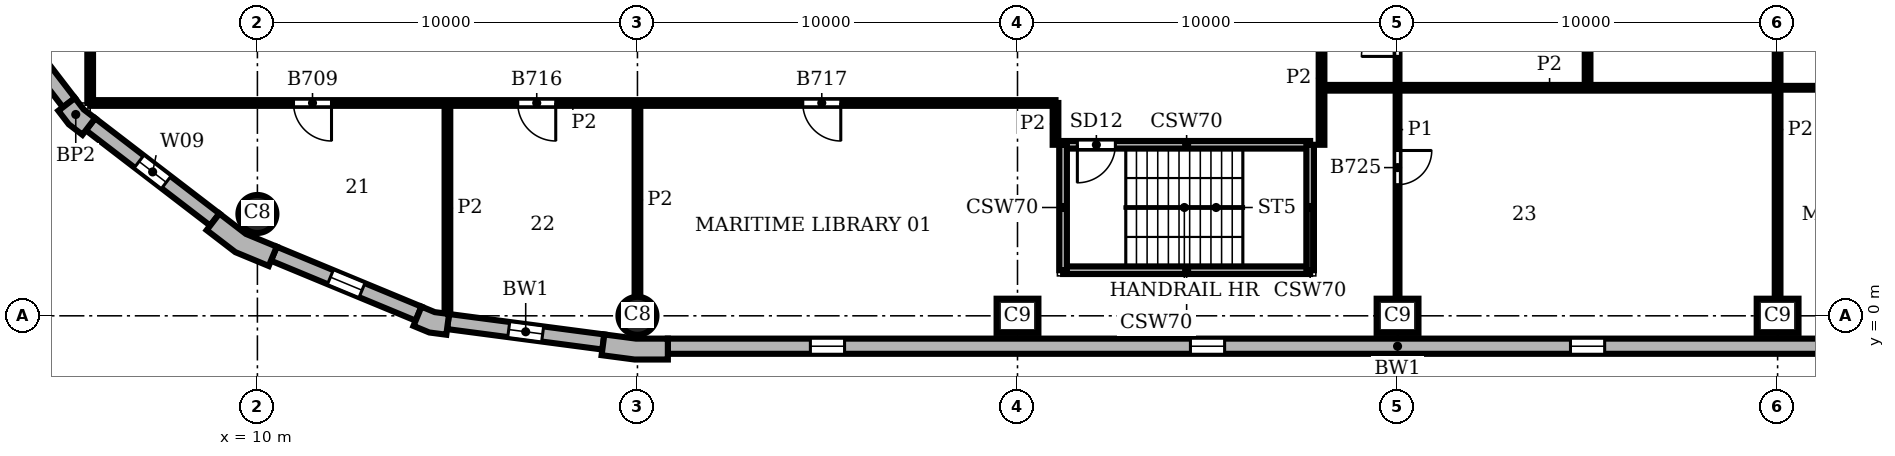
"""IFC4 building model, lengths in metres.
Left out: names, types, materials, properties, quantities, classifications, styles, units other than length and angle.
Written with IfcOpenShell. Run it as: python <this file> out.ifc"""

import sys

from ifc_helpers import new_model, si_unit, direction, frame, frame_2d, origin, origin_2d, place, context, subcontext, project, spatial, polyline, rectangle, circle, outline, extrude, element, fill, save


model = new_model("IFC4")
c1 = context("Model", 3, precision=1e-05, world=origin(), true_north=direction((0.0, 1.0)))
c2 = subcontext(c1, "Body", "Model", "MODEL_VIEW")
j1 = project(units=[si_unit("LENGTHUNIT", "METRE"), si_unit("PLANEANGLEUNIT", "RADIAN")], contexts=[c1])
p1 = place(None, origin())
s1 = spatial("IfcSite", under=j1, at=p1, CompositionType="ELEMENT")
p2 = place(p1, origin())
s2 = spatial("IfcBuilding", under=s1, at=p2, CompositionType="ELEMENT")
p3 = place(p2, frame((0.0, 0.0, 209.7)))
s3 = spatial("IfcBuildingStorey", under=s2, at=p3, CompositionType="ELEMENT", Elevation=209.7)
p4 = place(p3, frame((20.0, 0.0, 0.0), z_axis=(0.0, 0.0, 1.0), x_axis=(1.0, 0.0, 0.0)))
e1 = element("IfcColumn", 1, at=p4, inside=s3, PredefinedType="COLUMN", context=c2, shape_type="SweptSolid", body=[
    extrude(circle(Radius=0.5, at=origin_2d()), origin(), (0.0, 0.0, 1.0), 3.9),
])
for number, where, z_axis, x_axis in (
    (2, (30.0, 0.0, 0.0), (0.0, 0.0, 1.0), (1.0, 0.0, 0.0)),
    (3, (40.0, 0.0, 0.0), (0.0, 0.0, 1.0), (1.0, 0.0, 0.0)),
    (4, (50.0, 0.0, 0.0), (0.0, 0.0, 1.0), (1.0, 0.0, 0.0)),
):
    element("IfcColumn", number, at=place(p3, frame(where, z_axis=z_axis, x_axis=x_axis)), inside=s3, PredefinedType="COLUMN", context=c2, shape_type="SweptSolid", body=[
        extrude(rectangle(XDim=1.1, YDim=0.9, at=origin_2d()), origin(), (0.0, 0.0, 1.0), 3.9),
    ])
p5 = place(p3, frame((10.0, 2.679, 0.0), z_axis=(0.0, 0.0, 1.0), x_axis=(1.0, 0.0, 0.0)))
e5 = element("IfcColumn", 5, at=p5, inside=s3, PredefinedType="COLUMN", context=c2, shape_type="SweptSolid", body=[
    extrude(circle(Radius=0.5, at=origin_2d()), origin(), (0.0, 0.0, 1.0), 3.9),
])
p6 = place(p3, origin())
e6 = element("IfcWall", 6, at=p6, inside=s3, PredefinedType="SOLIDWALL", context=c2, shape_type="SweptSolid", body=[
    extrude(outline(polyline([(19.076, -0.887), (19.057, -1.036), (19.925, -1.15), (20.8, -1.15), (20.8, -1.0), (20.8, -0.6), (19.961, -0.6), (19.128, -0.49), (19.076, -0.887)])), origin(), (0.0, 0.0, 1.0), 3.9),
])
e7 = element("IfcWall", 7, at=p6, inside=s3, PredefinedType="SOLIDWALL", context=c2, shape_type="SweptSolid", body=[
    extrude(outline(polyline([(4.882, 5.487), (4.763, 5.396), (5.038, 5.038), (5.396, 4.763), (5.487, 4.882), (5.731, 5.199), (5.43, 5.43), (5.199, 5.731), (4.882, 5.487)])), origin(), (0.0, 0.0, 1.0), 3.9),
])
e8 = element("IfcWall", 8, at=p6, inside=s3, PredefinedType="SOLIDWALL", context=c2, shape_type="SweptSolid", body=[
    extrude(outline(polyline([(8.757, 2.373), (8.665, 2.254), (9.42, 1.675), (10.299, 1.311), (10.356, 1.449), (10.51, 1.819), (9.698, 2.155), (9.0, 2.69), (8.757, 2.373)])), origin(), (0.0, 0.0, 1.0), 3.9),
])
e9 = element("IfcWall", 9, at=p6, inside=s3, PredefinedType="SOLIDWALL", context=c2, shape_type="SweptSolid", body=[
    extrude(outline(polyline([(14.164, -0.128), (14.106, -0.266), (14.523, -0.439), (14.971, -0.498), (14.99, -0.349), (15.043, 0.047), (14.667, 0.097), (14.317, 0.242), (14.164, -0.128)])), origin(), (0.0, 0.0, 1.0), 3.9),
])
p7 = place(p3, frame((20.8, -0.8, 0.0), z_axis=(0.0, 0.0, 1.0), x_axis=(1.0, 0.0, 0.0)))
e10 = element("IfcWall", 10, at=p7, inside=s3, PredefinedType="SOLIDWALL", context=c2, shape_type="SweptSolid", body=[
    extrude(rectangle(XDim=38.4, YDim=0.4, at=frame_2d((19.2, 0.0))), origin(), (0.0, 0.0, 1.0), 3.9),
])
p8 = place(p7, frame((3.75, 0.0, 0.9)))
e11 = element("IfcOpeningElement", 11, at=p8, cuts=e10, PredefinedType="OPENING", context=c2, shape_type="SweptSolid", body=[
    extrude(rectangle(XDim=0.9, YDim=2.35, at=frame_2d((0.45, 1.175))), frame((0.0, 0.21, 0.0), z_axis=(0.0, -1.0, 0.0), x_axis=(1.0, 0.0, 0.0)), (0.0, 0.0, 1.0), 0.42),
])
p9 = place(p7, frame((13.75, 0.0, 0.9)))
e12 = element("IfcOpeningElement", 12, at=p9, cuts=e10, PredefinedType="OPENING", context=c2, shape_type="SweptSolid", body=[
    extrude(rectangle(XDim=0.9, YDim=2.35, at=frame_2d((0.45, 1.175))), frame((0.0, 0.21, 0.0), z_axis=(0.0, -1.0, 0.0), x_axis=(1.0, 0.0, 0.0)), (0.0, 0.0, 1.0), 0.42),
])
p10 = place(p7, frame((23.75, 0.0, 0.9)))
e13 = element("IfcOpeningElement", 13, at=p10, cuts=e10, PredefinedType="OPENING", context=c2, shape_type="SweptSolid", body=[
    extrude(rectangle(XDim=0.9, YDim=2.35, at=frame_2d((0.45, 1.175))), frame((0.0, 0.21, 0.0), z_axis=(0.0, -1.0, 0.0), x_axis=(1.0, 0.0, 0.0)), (0.0, 0.0, 1.0), 0.42),
])
p11 = place(p7, frame((33.75, 0.0, 0.9)))
e14 = element("IfcOpeningElement", 14, at=p11, cuts=e10, PredefinedType="OPENING", context=c2, shape_type="SweptSolid", body=[
    extrude(rectangle(XDim=0.9, YDim=2.35, at=frame_2d((0.45, 1.175))), frame((0.0, 0.21, 0.0), z_axis=(0.0, -1.0, 0.0), x_axis=(1.0, 0.0, 0.0)), (0.0, 0.0, 1.0), 0.42),
])
p12 = place(p3, frame((2.532, 8.878, 0.0), z_axis=(0.0, 0.0, 1.0), x_axis=(0.608759824817, -0.793354571229, 0.0)))
e15 = element("IfcWall", 15, at=p12, inside=s3, PredefinedType="SOLIDWALL", context=c2, shape_type="SweptSolid", body=[
    extrude(rectangle(XDim=4.121, YDim=0.4, at=frame_2d((2.061, 0.0))), origin(), (0.0, 0.0, 1.0), 3.9),
])
p13 = place(p12, frame((1.611, 0.0, 0.9)))
e16 = element("IfcOpeningElement", 16, at=p13, cuts=e15, PredefinedType="OPENING", context=c2, shape_type="SweptSolid", body=[
    extrude(rectangle(XDim=0.9, YDim=2.35, at=frame_2d((0.45, 1.175))), frame((0.0, 0.21, 0.0), z_axis=(0.0, -1.0, 0.0), x_axis=(1.0, 0.0, 0.0)), (0.0, 0.0, 1.0), 0.42),
])
p14 = place(p3, frame((5.609, 5.041, 0.0), z_axis=(0.0, 0.0, 1.0), x_axis=(0.793354571229, -0.608759824817, 0.0)))
e17 = element("IfcWall", 17, at=p14, inside=s3, PredefinedType="SOLIDWALL", context=c2, shape_type="SweptSolid", body=[
    extrude(rectangle(XDim=4.121, YDim=0.4, at=frame_2d((2.061, 0.0))), origin(), (0.0, 0.0, 1.0), 3.9),
])
p15 = place(p14, frame((1.611, 0.0, 0.9)))
e18 = element("IfcOpeningElement", 18, at=p15, cuts=e17, PredefinedType="OPENING", context=c2, shape_type="SweptSolid", body=[
    extrude(rectangle(XDim=0.9, YDim=2.35, at=frame_2d((0.45, 1.175))), frame((0.0, 0.21, 0.0), z_axis=(0.0, -1.0, 0.0), x_axis=(1.0, 0.0, 0.0)), (0.0, 0.0, 1.0), 0.42),
])
p16 = place(p3, frame((10.433, 1.634, 0.0), z_axis=(0.0, 0.0, 1.0), x_axis=(0.923863744394, -0.382721546029, 0.0)))
e19 = element("IfcWall", 19, at=p16, inside=s3, PredefinedType="SOLIDWALL", context=c2, shape_type="SweptSolid", body=[
    extrude(rectangle(XDim=4.121, YDim=0.4, at=frame_2d((2.061, 0.0))), origin(), (0.0, 0.0, 1.0), 3.9),
])
p17 = place(p16, frame((1.611, 0.0, 0.9)))
e20 = element("IfcOpeningElement", 20, at=p17, cuts=e19, PredefinedType="OPENING", context=c2, shape_type="SweptSolid", body=[
    extrude(rectangle(XDim=0.9, YDim=2.35, at=frame_2d((0.45, 1.175))), frame((0.0, 0.21, 0.0), z_axis=(0.0, -1.0, 0.0), x_axis=(1.0, 0.0, 0.0)), (0.0, 0.0, 1.0), 0.42),
])
p18 = place(p3, frame((15.017, -0.151, 0.0), z_axis=(0.0, 0.0, 1.0), x_axis=(0.991446429508, -0.130514280502, 0.0)))
e21 = element("IfcWall", 21, at=p18, inside=s3, PredefinedType="SOLIDWALL", context=c2, shape_type="SweptSolid", body=[
    extrude(rectangle(XDim=4.121, YDim=0.4, at=frame_2d((2.061, 0.0))), origin(), (0.0, 0.0, 1.0), 3.9),
])
p19 = place(p18, frame((1.611, 0.0, 0.9)))
e22 = element("IfcOpeningElement", 22, at=p19, cuts=e21, PredefinedType="OPENING", context=c2, shape_type="SweptSolid", body=[
    extrude(rectangle(XDim=0.9, YDim=2.35, at=frame_2d((0.45, 1.175))), frame((0.0, 0.21, 0.0), z_axis=(0.0, -1.0, 0.0), x_axis=(1.0, 0.0, 0.0)), (0.0, 0.0, 1.0), 0.42),
])
p20 = place(p3, frame((31.2, 1.2, 0.0), z_axis=(0.0, 0.0, 1.0), x_axis=(1.0, 0.0, 0.0)))
e23 = element("IfcWall", 23, at=p20, inside=s3, PredefinedType="SHEAR", context=c2, shape_type="SweptSolid", body=[
    extrude(rectangle(XDim=6.5, YDim=0.2, at=frame_2d((3.25, 0.0))), origin(), (0.0, 0.0, 1.0), 3.58),
])
p21 = place(p3, frame((31.2, 4.5, 0.0), z_axis=(0.0, 0.0, 1.0), x_axis=(1.0, 0.0, 0.0)))
e24 = element("IfcWall", 24, at=p21, inside=s3, PredefinedType="SHEAR", context=c2, shape_type="SweptSolid", body=[
    extrude(rectangle(XDim=6.5, YDim=0.2, at=frame_2d((3.25, 0.0))), origin(), (0.0, 0.0, 1.0), 3.58),
])
p22 = place(p21, frame((0.375, 0.0, 0.0)))
e25 = element("IfcOpeningElement", 25, at=p22, cuts=e24, PredefinedType="OPENING", context=c2, shape_type="SweptSolid", body=[
    extrude(rectangle(XDim=1.0, YDim=2.1, at=frame_2d((0.5, 1.05))), frame((0.0, 0.11, 0.0), z_axis=(0.0, -1.0, 0.0), x_axis=(1.0, 0.0, 0.0)), (0.0, 0.0, 1.0), 0.22),
])
for number, where, z_axis, x_axis in (
    (26, (31.2, 1.2, 0.0), (0.0, 0.0, 1.0), (0.0, 1.0, 0.0)),
    (27, (37.7, 1.2, 0.0), (0.0, 0.0, 1.0), (0.0, 1.0, 0.0)),
):
    element("IfcWall", number, at=place(p3, frame(where, z_axis=z_axis, x_axis=x_axis)), inside=s3, PredefinedType="SHEAR", context=c2, shape_type="SweptSolid", body=[
        extrude(rectangle(XDim=3.3, YDim=0.2, at=frame_2d((1.65, 0.0))), origin(), (0.0, 0.0, 1.0), 3.58),
    ])
p23 = place(p3, frame((40.0, 0.45, 0.0), z_axis=(0.0, 0.0, 1.0), x_axis=(0.0, 1.0, 0.0)))
e28 = element("IfcWall", 28, at=p23, inside=s3, PredefinedType="PARTITIONING", context=c2, shape_type="SweptSolid", body=[
    extrude(rectangle(XDim=8.9, YDim=0.1, at=frame_2d((4.45, 0.0))), origin(), (0.0, 0.0, 1.0), 3.58),
])
p24 = place(p23, frame((6.375, 0.0, 0.0)))
e29 = element("IfcOpeningElement", 29, at=p24, cuts=e28, PredefinedType="OPENING", context=c2, shape_type="SweptSolid", body=[
    extrude(rectangle(XDim=0.95, YDim=2.1, at=frame_2d((0.475, 1.05))), frame((0.0, 0.06, 0.0), z_axis=(0.0, -1.0, 0.0), x_axis=(1.0, 0.0, 0.0)), (0.0, 0.0, 1.0), 0.12),
])
p25 = place(p23, frame((3.0, 0.0, 0.0)))
e30 = element("IfcOpeningElement", 30, at=p25, cuts=e28, PredefinedType="OPENING", context=c2, shape_type="SweptSolid", body=[
    extrude(rectangle(XDim=0.9, YDim=2.1, at=frame_2d((0.45, 1.05))), frame((0.0, 0.06, 0.0), z_axis=(0.0, -1.0, 0.0), x_axis=(1.0, 0.0, 0.0)), (0.0, 0.0, 1.0), 0.12),
])
p26 = place(p3, frame((50.0, 6.0, 0.0), z_axis=(0.0, 0.0, 1.0), x_axis=(1.0, 0.0, 0.0)))
e31 = element("IfcWall", 31, at=p26, inside=s3, PredefinedType="PARTITIONING", context=c2, shape_type="SweptSolid", body=[
    extrude(rectangle(XDim=5.0, YDim=0.1, at=frame_2d((2.5, 0.0))), origin(), (0.0, 0.0, 1.0), 3.58),
])
p27 = place(p3, frame((5.6, 5.6, 0.0), z_axis=(0.0, 0.0, 1.0), x_axis=(0.0, 1.0, 0.0)))
e32 = element("IfcWall", 32, at=p27, inside=s3, PredefinedType="PARTITIONING", context=c2, shape_type="SweptSolid", body=[
    extrude(rectangle(XDim=22.4, YDim=0.15, at=frame_2d((11.2, 0.0))), origin(), (0.0, 0.0, 1.0), 3.58),
])
p28 = place(p27, frame((5.35, 0.0, 0.0)))
e33 = element("IfcOpeningElement", 33, at=p28, cuts=e32, PredefinedType="OPENING", context=c2, shape_type="SweptSolid", body=[
    extrude(rectangle(XDim=1.0, YDim=2.1, at=frame_2d((0.5, 1.05))), frame((0.0, 0.085, 0.0), z_axis=(0.0, -1.0, 0.0), x_axis=(1.0, 0.0, 0.0)), (0.0, 0.0, 1.0), 0.17),
])
p29 = place(p27, frame((11.5, 0.0, 0.0)))
e34 = element("IfcOpeningElement", 34, at=p29, cuts=e32, PredefinedType="OPENING", context=c2, shape_type="SweptSolid", body=[
    extrude(rectangle(XDim=1.0, YDim=2.1, at=frame_2d((0.5, 1.05))), frame((0.0, 0.085, 0.0), z_axis=(0.0, -1.0, 0.0), x_axis=(1.0, 0.0, 0.0)), (0.0, 0.0, 1.0), 0.17),
])
p30 = place(p27, frame((18.25, 0.0, 0.0)))
e35 = element("IfcOpeningElement", 35, at=p30, cuts=e32, PredefinedType="OPENING", context=c2, shape_type="SweptSolid", body=[
    extrude(rectangle(XDim=1.8, YDim=2.1, at=frame_2d((0.9, 1.05))), frame((0.0, 0.085, 0.0), z_axis=(0.0, -1.0, 0.0), x_axis=(1.0, 0.0, 0.0)), (0.0, 0.0, 1.0), 0.17),
])
p31 = place(p3, frame((15.0, 0.063, 0.0), z_axis=(0.0, 0.0, 1.0), x_axis=(0.0, 1.0, 0.0)))
e36 = element("IfcWall", 36, at=p31, inside=s3, PredefinedType="PARTITIONING", context=c2, shape_type="SweptSolid", body=[
    extrude(rectangle(XDim=5.537, YDim=0.15, at=frame_2d((2.769, 0.0))), origin(), (0.0, 0.0, 1.0), 3.58),
])
p32 = place(p3, frame((20.0, 0.5, 0.0), z_axis=(0.0, 0.0, 1.0), x_axis=(0.0, 1.0, 0.0)))
e37 = element("IfcWall", 37, at=p32, inside=s3, PredefinedType="PARTITIONING", context=c2, shape_type="SweptSolid", body=[
    extrude(rectangle(XDim=5.1, YDim=0.15, at=frame_2d((2.55, 0.0))), origin(), (0.0, 0.0, 1.0), 3.58),
])
p33 = place(p3, frame((31.0, 4.5, 0.0), z_axis=(0.0, 0.0, 1.0), x_axis=(0.0, 1.0, 0.0)))
e38 = element("IfcWall", 38, at=p33, inside=s3, PredefinedType="PARTITIONING", context=c2, shape_type="SweptSolid", body=[
    extrude(rectangle(XDim=1.1, YDim=0.15, at=frame_2d((0.55, 0.0))), origin(), (0.0, 0.0, 1.0), 3.58),
])
p34 = place(p3, frame((38.0, 4.5, 0.0), z_axis=(0.0, 0.0, 1.0), x_axis=(0.0, 1.0, 0.0)))
e39 = element("IfcWall", 39, at=p34, inside=s3, PredefinedType="PARTITIONING", context=c2, shape_type="SweptSolid", body=[
    extrude(rectangle(XDim=3.5, YDim=0.15, at=frame_2d((1.75, 0.0))), origin(), (0.0, 0.0, 1.0), 3.58),
])
p35 = place(p3, frame((45.0, 6.0, 0.0), z_axis=(0.0, 0.0, 1.0), x_axis=(0.0, 1.0, 0.0)))
e40 = element("IfcWall", 40, at=p35, inside=s3, PredefinedType="PARTITIONING", context=c2, shape_type="SweptSolid", body=[
    extrude(rectangle(XDim=7.5, YDim=0.15, at=frame_2d((3.75, 0.0))), origin(), (0.0, 0.0, 1.0), 3.58),
])
p36 = place(p3, frame((50.0, 0.45, 0.0), z_axis=(0.0, 0.0, 1.0), x_axis=(0.0, 1.0, 0.0)))
e41 = element("IfcWall", 41, at=p36, inside=s3, PredefinedType="PARTITIONING", context=c2, shape_type="SweptSolid", body=[
    extrude(rectangle(XDim=8.9, YDim=0.15, at=frame_2d((4.45, 0.0))), origin(), (0.0, 0.0, 1.0), 3.58),
])
p37 = place(p3, frame((5.6, 5.6, 0.0), z_axis=(0.0, 0.0, 1.0), x_axis=(1.0, 0.0, 0.0)))
e42 = element("IfcWall", 42, at=p37, inside=s3, PredefinedType="PARTITIONING", context=c2, shape_type="SweptSolid", body=[
    extrude(rectangle(XDim=25.4, YDim=0.15, at=frame_2d((12.7, 0.0))), origin(), (0.0, 0.0, 1.0), 3.58),
])
p38 = place(p37, frame((5.35, 0.0, 0.0)))
e43 = element("IfcOpeningElement", 43, at=p38, cuts=e42, PredefinedType="OPENING", context=c2, shape_type="SweptSolid", body=[
    extrude(rectangle(XDim=1.0, YDim=2.1, at=frame_2d((0.5, 1.05))), frame((0.0, 0.085, 0.0), z_axis=(0.0, -1.0, 0.0), x_axis=(1.0, 0.0, 0.0)), (0.0, 0.0, 1.0), 0.17),
])
p39 = place(p37, frame((11.25, 0.0, 0.0)))
e44 = element("IfcOpeningElement", 44, at=p39, cuts=e42, PredefinedType="OPENING", context=c2, shape_type="SweptSolid", body=[
    extrude(rectangle(XDim=1.0, YDim=2.1, at=frame_2d((0.5, 1.05))), frame((0.0, 0.085, 0.0), z_axis=(0.0, -1.0, 0.0), x_axis=(1.0, 0.0, 0.0)), (0.0, 0.0, 1.0), 0.17),
])
p40 = place(p37, frame((18.75, 0.0, 0.0)))
e45 = element("IfcOpeningElement", 45, at=p40, cuts=e42, PredefinedType="OPENING", context=c2, shape_type="SweptSolid", body=[
    extrude(rectangle(XDim=1.0, YDim=2.1, at=frame_2d((0.5, 1.05))), frame((0.0, 0.085, 0.0), z_axis=(0.0, -1.0, 0.0), x_axis=(1.0, 0.0, 0.0)), (0.0, 0.0, 1.0), 0.17),
])
p41 = place(p3, frame((38.0, 6.0, 0.0), z_axis=(0.0, 0.0, 1.0), x_axis=(1.0, 0.0, 0.0)))
e46 = element("IfcWall", 46, at=p41, inside=s3, PredefinedType="PARTITIONING", context=c2, shape_type="SweptSolid", body=[
    extrude(rectangle(XDim=12.0, YDim=0.15, at=frame_2d((6.0, 0.0))), origin(), (0.0, 0.0, 1.0), 3.58),
])
p42 = place(p8, origin())
e47 = element("IfcWindow", 47, at=p42, inside=s3, PartitioningType="SINGLE_PANEL", PredefinedType="WINDOW", context=c2, shape_type="SweptSolid", body=[
    extrude(rectangle(XDim=0.9, YDim=2.35, at=frame_2d((0.45, 1.175))), frame((0.0, 0.16, 0.0), z_axis=(0.0, -1.0, 0.0), x_axis=(1.0, 0.0, 0.0)), (0.0, 0.0, 1.0), 0.06),
])
fill(e11, e47)
p43 = place(p9, origin())
e48 = element("IfcWindow", 48, at=p43, inside=s3, PartitioningType="SINGLE_PANEL", PredefinedType="WINDOW", context=c2, shape_type="SweptSolid", body=[
    extrude(rectangle(XDim=0.9, YDim=2.35, at=frame_2d((0.45, 1.175))), frame((0.0, 0.16, 0.0), z_axis=(0.0, -1.0, 0.0), x_axis=(1.0, 0.0, 0.0)), (0.0, 0.0, 1.0), 0.06),
])
fill(e12, e48)
p44 = place(p10, origin())
e49 = element("IfcWindow", 49, at=p44, inside=s3, PartitioningType="SINGLE_PANEL", PredefinedType="WINDOW", context=c2, shape_type="SweptSolid", body=[
    extrude(rectangle(XDim=0.9, YDim=2.35, at=frame_2d((0.45, 1.175))), frame((0.0, 0.16, 0.0), z_axis=(0.0, -1.0, 0.0), x_axis=(1.0, 0.0, 0.0)), (0.0, 0.0, 1.0), 0.06),
])
fill(e13, e49)
p45 = place(p15, origin())
e50 = element("IfcWindow", 50, at=p45, inside=s3, PartitioningType="SINGLE_PANEL", PredefinedType="WINDOW", context=c2, shape_type="SweptSolid", body=[
    extrude(rectangle(XDim=0.9, YDim=2.35, at=frame_2d((0.45, 1.175))), frame((0.0, 0.16, 0.0), z_axis=(0.0, -1.0, 0.0), x_axis=(1.0, 0.0, 0.0)), (0.0, 0.0, 1.0), 0.06),
])
fill(e18, e50)
p46 = place(p17, origin())
e51 = element("IfcWindow", 51, at=p46, inside=s3, PartitioningType="SINGLE_PANEL", PredefinedType="WINDOW", context=c2, shape_type="SweptSolid", body=[
    extrude(rectangle(XDim=0.9, YDim=2.35, at=frame_2d((0.45, 1.175))), frame((0.0, 0.16, 0.0), z_axis=(0.0, -1.0, 0.0), x_axis=(1.0, 0.0, 0.0)), (0.0, 0.0, 1.0), 0.06),
])
fill(e20, e51)
p47 = place(p19, origin())
e52 = element("IfcWindow", 52, at=p47, inside=s3, PartitioningType="SINGLE_PANEL", PredefinedType="WINDOW", context=c2, shape_type="SweptSolid", body=[
    extrude(rectangle(XDim=0.9, YDim=2.35, at=frame_2d((0.45, 1.175))), frame((0.0, 0.16, 0.0), z_axis=(0.0, -1.0, 0.0), x_axis=(1.0, 0.0, 0.0)), (0.0, 0.0, 1.0), 0.06),
])
fill(e22, e52)
p48 = place(p22, frame((1.0, 0.0, 0.0), z_axis=(0.0, 0.0, 1.0), x_axis=(-1.0, 0.0, 0.0)))
e53 = element("IfcDoor", 53, at=p48, inside=s3, OperationType="SINGLE_SWING_RIGHT", PredefinedType="DOOR", context=c2, shape_type="SweptSolid", body=[
    extrude(rectangle(XDim=1.0, YDim=2.1, at=frame_2d((0.5, 1.05))), frame((0.0, 0.025, 0.0), z_axis=(0.0, -1.0, 0.0), x_axis=(1.0, 0.0, 0.0)), (0.0, 0.0, 1.0), 0.05),
])
fill(e25, e53)
p49 = place(p38, frame((1.0, 0.0, 0.0), z_axis=(0.0, 0.0, 1.0), x_axis=(-1.0, 0.0, 0.0)))
e54 = element("IfcDoor", 54, at=p49, inside=s3, OperationType="SINGLE_SWING_LEFT", PredefinedType="DOOR", context=c2, shape_type="SweptSolid", body=[
    extrude(rectangle(XDim=1.0, YDim=2.1, at=frame_2d((0.5, 1.05))), frame((0.0, 0.025, 0.0), z_axis=(0.0, -1.0, 0.0), x_axis=(1.0, 0.0, 0.0)), (0.0, 0.0, 1.0), 0.05),
])
fill(e43, e54)
p50 = place(p39, frame((1.0, 0.0, 0.0), z_axis=(0.0, 0.0, 1.0), x_axis=(-1.0, 0.0, 0.0)))
e55 = element("IfcDoor", 55, at=p50, inside=s3, OperationType="SINGLE_SWING_LEFT", PredefinedType="DOOR", context=c2, shape_type="SweptSolid", body=[
    extrude(rectangle(XDim=1.0, YDim=2.1, at=frame_2d((0.5, 1.05))), frame((0.0, 0.025, 0.0), z_axis=(0.0, -1.0, 0.0), x_axis=(1.0, 0.0, 0.0)), (0.0, 0.0, 1.0), 0.05),
])
fill(e44, e55)
p51 = place(p40, frame((1.0, 0.0, 0.0), z_axis=(0.0, 0.0, 1.0), x_axis=(-1.0, 0.0, 0.0)))
e56 = element("IfcDoor", 56, at=p51, inside=s3, OperationType="SINGLE_SWING_LEFT", PredefinedType="DOOR", context=c2, shape_type="SweptSolid", body=[
    extrude(rectangle(XDim=1.0, YDim=2.1, at=frame_2d((0.5, 1.05))), frame((0.0, 0.025, 0.0), z_axis=(0.0, -1.0, 0.0), x_axis=(1.0, 0.0, 0.0)), (0.0, 0.0, 1.0), 0.05),
])
fill(e45, e56)
p52 = place(p24, origin())
e57 = element("IfcDoor", 57, at=p52, inside=s3, OperationType="SINGLE_SWING_LEFT", PredefinedType="DOOR", context=c2, shape_type="SweptSolid", body=[
    extrude(rectangle(XDim=0.95, YDim=2.1, at=frame_2d((0.475, 1.05))), frame((0.0, 0.025, 0.0), z_axis=(0.0, -1.0, 0.0), x_axis=(1.0, 0.0, 0.0)), (0.0, 0.0, 1.0), 0.05),
])
fill(e29, e57)
p53 = place(p25, frame((0.9, 0.0, 0.0), z_axis=(0.0, 0.0, 1.0), x_axis=(-1.0, 0.0, 0.0)))
e58 = element("IfcDoor", 58, at=p53, inside=s3, OperationType="SINGLE_SWING_LEFT", PredefinedType="DOOR", context=c2, shape_type="SweptSolid", body=[
    extrude(rectangle(XDim=0.9, YDim=2.1, at=frame_2d((0.45, 1.05))), frame((0.0, 0.025, 0.0), z_axis=(0.0, -1.0, 0.0), x_axis=(1.0, 0.0, 0.0)), (0.0, 0.0, 1.0), 0.05),
])
fill(e30, e58)
save(model, sys.argv[1])
